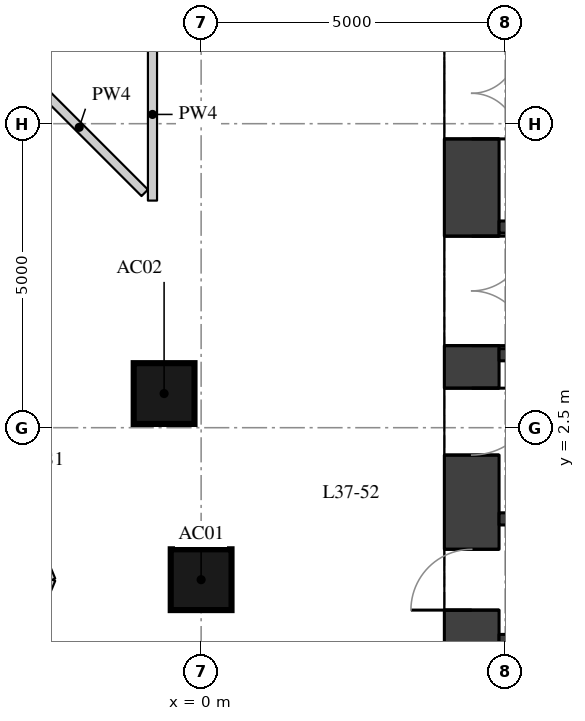
"""IFC4 building model, lengths in metres.
Left out: names, types, materials, properties, quantities, classifications, styles, units other than length and angle.
Written with IfcOpenShell. Run it as: python <this file> out.ifc"""

import sys

from ifc_helpers import new_model, si_unit, direction, frame, frame_2d, origin, origin_2d, place, context, subcontext, project, spatial, rectangle, extrude, element, fill, save


model = new_model("IFC4")
c1 = context("Model", 3, precision=1e-05, world=origin(), true_north=direction((0.0, 1.0)))
c2 = subcontext(c1, "Body", "Model", "MODEL_VIEW")
j1 = project(units=[si_unit("LENGTHUNIT", "METRE"), si_unit("PLANEANGLEUNIT", "RADIAN")], contexts=[c1])
p1 = place(None, origin())
s1 = spatial("IfcSite", under=j1, at=p1, CompositionType="ELEMENT")
p2 = place(p1, origin())
s2 = spatial("IfcBuilding", under=s1, at=p2, CompositionType="ELEMENT")
p3 = place(p2, frame((0.0, 0.0, 131.8)))
s3 = spatial("IfcBuildingStorey", under=s2, at=p3, CompositionType="ELEMENT", Elevation=131.8)
for number, where, z_axis, x_axis in (
    (1, (0.0, 0.0, 0.0), (0.0, 0.0, 1.0), (1.0, 0.0, 0.0)),
    (2, (-0.609, 3.062, 0.0), (0.0, 0.0, 1.0), (1.0, 0.0, 0.0)),
):
    element("IfcColumn", number, at=place(p3, frame(where, z_axis=z_axis, x_axis=x_axis)), inside=s3, PredefinedType="COLUMN", context=c2, shape_type="SweptSolid", body=[
        extrude(rectangle(XDim=1.0, YDim=1.0, at=origin_2d()), origin(), (0.0, 0.0, 1.0), 3.3),
    ])
p4 = place(p3, frame((4.45, -11.1, 0.0), z_axis=(0.0, 0.0, 1.0), x_axis=(0.0, 1.0, 0.0)))
e3 = element("IfcWall", 3, at=p4, inside=s3, PredefinedType="SHEAR", context=c2, shape_type="SweptSolid", body=[
    extrude(rectangle(XDim=22.2, YDim=0.9, at=frame_2d((11.1, 0.0))), origin(), (0.0, 0.0, 1.0), 2.85),
])
p5 = place(p4, frame((2.35, 0.0, 0.0)))
e4 = element("IfcOpeningElement", 4, at=p5, cuts=e3, PredefinedType="OPENING", context=c2, shape_type="SweptSolid", body=[
    extrude(rectangle(XDim=1.5, YDim=2.1, at=frame_2d((0.75, 1.05))), frame((0.0, 0.46, 0.0), z_axis=(0.0, -1.0, 0.0), x_axis=(1.0, 0.0, 0.0)), (0.0, 0.0, 1.0), 0.92),
])
p6 = place(p4, frame((5.45, 0.0, 0.0)))
e5 = element("IfcOpeningElement", 5, at=p6, cuts=e3, PredefinedType="OPENING", context=c2, shape_type="SweptSolid", body=[
    extrude(rectangle(XDim=1.8, YDim=2.1, at=frame_2d((0.9, 1.05))), frame((0.0, 0.46, 0.0), z_axis=(0.0, -1.0, 0.0), x_axis=(1.0, 0.0, 0.0)), (0.0, 0.0, 1.0), 0.92),
])
p7 = place(p4, frame((7.95, 0.0, 0.0)))
e6 = element("IfcOpeningElement", 6, at=p7, cuts=e3, PredefinedType="OPENING", context=c2, shape_type="SweptSolid", body=[
    extrude(rectangle(XDim=1.1, YDim=2.1, at=frame_2d((0.55, 1.05))), frame((0.0, 0.46, 0.0), z_axis=(0.0, -1.0, 0.0), x_axis=(1.0, 0.0, 0.0)), (0.0, 0.0, 1.0), 0.92),
])
p8 = place(p4, frame((10.6, 0.0, 0.0)))
e7 = element("IfcOpeningElement", 7, at=p8, cuts=e3, PredefinedType="OPENING", context=c2, shape_type="SweptSolid", body=[
    extrude(rectangle(XDim=1.0, YDim=2.1, at=frame_2d((0.5, 1.05))), frame((0.0, 0.46, 0.0), z_axis=(0.0, -1.0, 0.0), x_axis=(1.0, 0.0, 0.0)), (0.0, 0.0, 1.0), 0.92),
])
p9 = place(p4, frame((13.15, 0.0, 0.0)))
e8 = element("IfcOpeningElement", 8, at=p9, cuts=e3, PredefinedType="OPENING", context=c2, shape_type="SweptSolid", body=[
    extrude(rectangle(XDim=1.1, YDim=2.1, at=frame_2d((0.55, 1.05))), frame((0.0, 0.46, 0.0), z_axis=(0.0, -1.0, 0.0), x_axis=(1.0, 0.0, 0.0)), (0.0, 0.0, 1.0), 0.92),
])
p10 = place(p4, frame((14.95, 0.0, 0.0)))
e9 = element("IfcOpeningElement", 9, at=p10, cuts=e3, PredefinedType="OPENING", context=c2, shape_type="SweptSolid", body=[
    extrude(rectangle(XDim=1.8, YDim=2.1, at=frame_2d((0.9, 1.05))), frame((0.0, 0.46, 0.0), z_axis=(0.0, -1.0, 0.0), x_axis=(1.0, 0.0, 0.0)), (0.0, 0.0, 1.0), 0.92),
])
p11 = place(p4, frame((18.35, 0.0, 0.0)))
e10 = element("IfcOpeningElement", 10, at=p11, cuts=e3, PredefinedType="OPENING", context=c2, shape_type="SweptSolid", body=[
    extrude(rectangle(XDim=1.5, YDim=2.1, at=frame_2d((0.75, 1.05))), frame((0.0, 0.46, 0.0), z_axis=(0.0, -1.0, 0.0), x_axis=(1.0, 0.0, 0.0)), (0.0, 0.0, 1.0), 0.92),
])
p12 = place(p3, frame((4.9, 5.8, 0.0), z_axis=(0.0, 0.0, 1.0), x_axis=(1.0, 0.0, 0.0)))
e11 = element("IfcWall", 11, at=p12, inside=s3, PredefinedType="SHEAR", context=c2, shape_type="SweptSolid", body=[
    extrude(rectangle(XDim=10.2, YDim=0.2, at=frame_2d((5.1, 0.0))), origin(), (0.0, 0.0, 1.0), 2.85),
])
p13 = place(p12, frame((6.75, 0.0, 0.0)))
e12 = element("IfcOpeningElement", 12, at=p13, cuts=e11, PredefinedType="OPENING", context=c2, shape_type="SweptSolid", body=[
    extrude(rectangle(XDim=1.1, YDim=2.1, at=frame_2d((0.55, 1.05))), frame((0.0, 0.11, 0.0), z_axis=(0.0, -1.0, 0.0), x_axis=(1.0, 0.0, 0.0)), (0.0, 0.0, 1.0), 0.22),
])
p14 = place(p12, frame((8.75, 0.0, 0.0)))
e13 = element("IfcOpeningElement", 13, at=p14, cuts=e11, PredefinedType="OPENING", context=c2, shape_type="SweptSolid", body=[
    extrude(rectangle(XDim=1.1, YDim=2.1, at=frame_2d((0.55, 1.05))), frame((0.0, 0.11, 0.0), z_axis=(0.0, -1.0, 0.0), x_axis=(1.0, 0.0, 0.0)), (0.0, 0.0, 1.0), 0.22),
])
p15 = place(p3, frame((4.9, 3.7, 0.0), z_axis=(0.0, 0.0, 1.0), x_axis=(1.0, 0.0, 0.0)))
e14 = element("IfcWall", 14, at=p15, inside=s3, PredefinedType="SHEAR", context=c2, shape_type="SweptSolid", body=[
    extrude(rectangle(XDim=10.2, YDim=0.2, at=frame_2d((5.1, 0.0))), origin(), (0.0, 0.0, 1.0), 2.85),
])
p16 = place(p15, frame((6.3, 0.0, 0.0)))
e15 = element("IfcOpeningElement", 15, at=p16, cuts=e14, PredefinedType="OPENING", context=c2, shape_type="SweptSolid", body=[
    extrude(rectangle(XDim=1.1, YDim=2.1, at=frame_2d((0.55, 1.05))), frame((0.0, 0.11, 0.0), z_axis=(0.0, -1.0, 0.0), x_axis=(1.0, 0.0, 0.0)), (0.0, 0.0, 1.0), 0.22),
])
p17 = place(p15, frame((8.6, 0.0, 0.0)))
e16 = element("IfcOpeningElement", 16, at=p17, cuts=e14, PredefinedType="OPENING", context=c2, shape_type="SweptSolid", body=[
    extrude(rectangle(XDim=1.1, YDim=2.1, at=frame_2d((0.55, 1.05))), frame((0.0, 0.11, 0.0), z_axis=(0.0, -1.0, 0.0), x_axis=(1.0, 0.0, 0.0)), (0.0, 0.0, 1.0), 0.22),
])
for number, where, z_axis, x_axis in (
    (17, (4.9, 1.0, 0.0), (0.0, 0.0, 1.0), (1.0, 0.0, 0.0)),
    (18, (4.9, -1.0, 0.0), (0.0, 0.0, 1.0), (1.0, 0.0, 0.0)),
):
    element("IfcWall", number, at=place(p3, frame(where, z_axis=z_axis, x_axis=x_axis)), inside=s3, PredefinedType="SHEAR", context=c2, shape_type="SweptSolid", body=[
        extrude(rectangle(XDim=10.2, YDim=0.2, at=frame_2d((5.1, 0.0))), origin(), (0.0, 0.0, 1.0), 2.85),
    ])
p18 = place(p3, frame((-0.8, 9.07, 0.0), z_axis=(0.0, 0.0, 1.0), x_axis=(0.0, -1.0, 0.0)))
e19 = element("IfcWall", 19, at=p18, inside=s3, PredefinedType="PARTITIONING", context=c2, shape_type="SweptSolid", body=[
    extrude(rectangle(XDim=2.835, YDim=0.15, at=frame_2d((1.417, 0.0))), origin(), (0.0, 0.0, 1.0), 2.85),
])
p19 = place(p3, frame((-0.927, 6.363, 0.0), z_axis=(0.0, 0.0, 1.0), x_axis=(-0.707106781187, 0.707106781187, 0.0)))
e20 = element("IfcWall", 20, at=p19, inside=s3, PredefinedType="PARTITIONING", context=c2, shape_type="SweptSolid", body=[
    extrude(rectangle(XDim=3.048, YDim=0.15, at=frame_2d((1.524, 0.0))), origin(), (0.0, 0.0, 1.0), 2.85),
])
for number, where, z_axis, x_axis in (
    (21, (-2.446, 0.0, 0.0), (0.0, 0.0, 1.0), (-0.383, -0.924, 0.0)),
    (22, (-4.073, 3.927, 0.0), (0.0, 0.0, 1.0), (0.383, -0.924, 0.0)),
):
    element("IfcWall", number, at=place(p3, frame(where, z_axis=z_axis, x_axis=x_axis)), inside=s3, PredefinedType="PARTITIONING", context=c2, shape_type="SweptSolid", body=[
        extrude(rectangle(XDim=4.251, YDim=0.1, at=frame_2d((2.125, 0.0))), origin(), (0.0, 0.0, 1.0), 2.85),
    ])
p20 = place(p8, origin())
e23 = element("IfcDoor", 23, at=p20, inside=s3, OperationType="SINGLE_SWING_LEFT", PredefinedType="DOOR", context=c2, shape_type="SweptSolid", body=[
    extrude(rectangle(XDim=1.0, YDim=2.1, at=frame_2d((0.5, 1.05))), frame((0.0, 0.025, 0.0), z_axis=(0.0, -1.0, 0.0), x_axis=(1.0, 0.0, 0.0)), (0.0, 0.0, 1.0), 0.05),
])
fill(e7, e23)
p21 = place(p9, origin())
e24 = element("IfcDoor", 24, at=p21, inside=s3, OperationType="SINGLE_SWING_LEFT", PredefinedType="DOOR", context=c2, shape_type="SweptSolid", body=[
    extrude(rectangle(XDim=1.1, YDim=2.1, at=frame_2d((0.55, 1.05))), frame((0.0, 0.025, 0.0), z_axis=(0.0, -1.0, 0.0), x_axis=(1.0, 0.0, 0.0)), (0.0, 0.0, 1.0), 0.05),
])
fill(e8, e24)
p22 = place(p10, origin())
e25 = element("IfcDoor", 25, at=p22, inside=s3, OperationType="DOUBLE_DOOR_SINGLE_SWING", PredefinedType="DOOR", context=c2, shape_type="SweptSolid", body=[
    extrude(rectangle(XDim=1.8, YDim=2.1, at=frame_2d((0.9, 1.05))), frame((0.0, 0.025, 0.0), z_axis=(0.0, -1.0, 0.0), x_axis=(1.0, 0.0, 0.0)), (0.0, 0.0, 1.0), 0.05),
])
fill(e9, e25)
p23 = place(p11, origin())
e26 = element("IfcDoor", 26, at=p23, inside=s3, OperationType="DOUBLE_DOOR_SINGLE_SWING", PredefinedType="DOOR", context=c2, shape_type="SweptSolid", body=[
    extrude(rectangle(XDim=1.5, YDim=2.1, at=frame_2d((0.75, 1.05))), frame((0.0, 0.025, 0.0), z_axis=(0.0, -1.0, 0.0), x_axis=(1.0, 0.0, 0.0)), (0.0, 0.0, 1.0), 0.05),
])
fill(e10, e26)
save(model, sys.argv[1])
